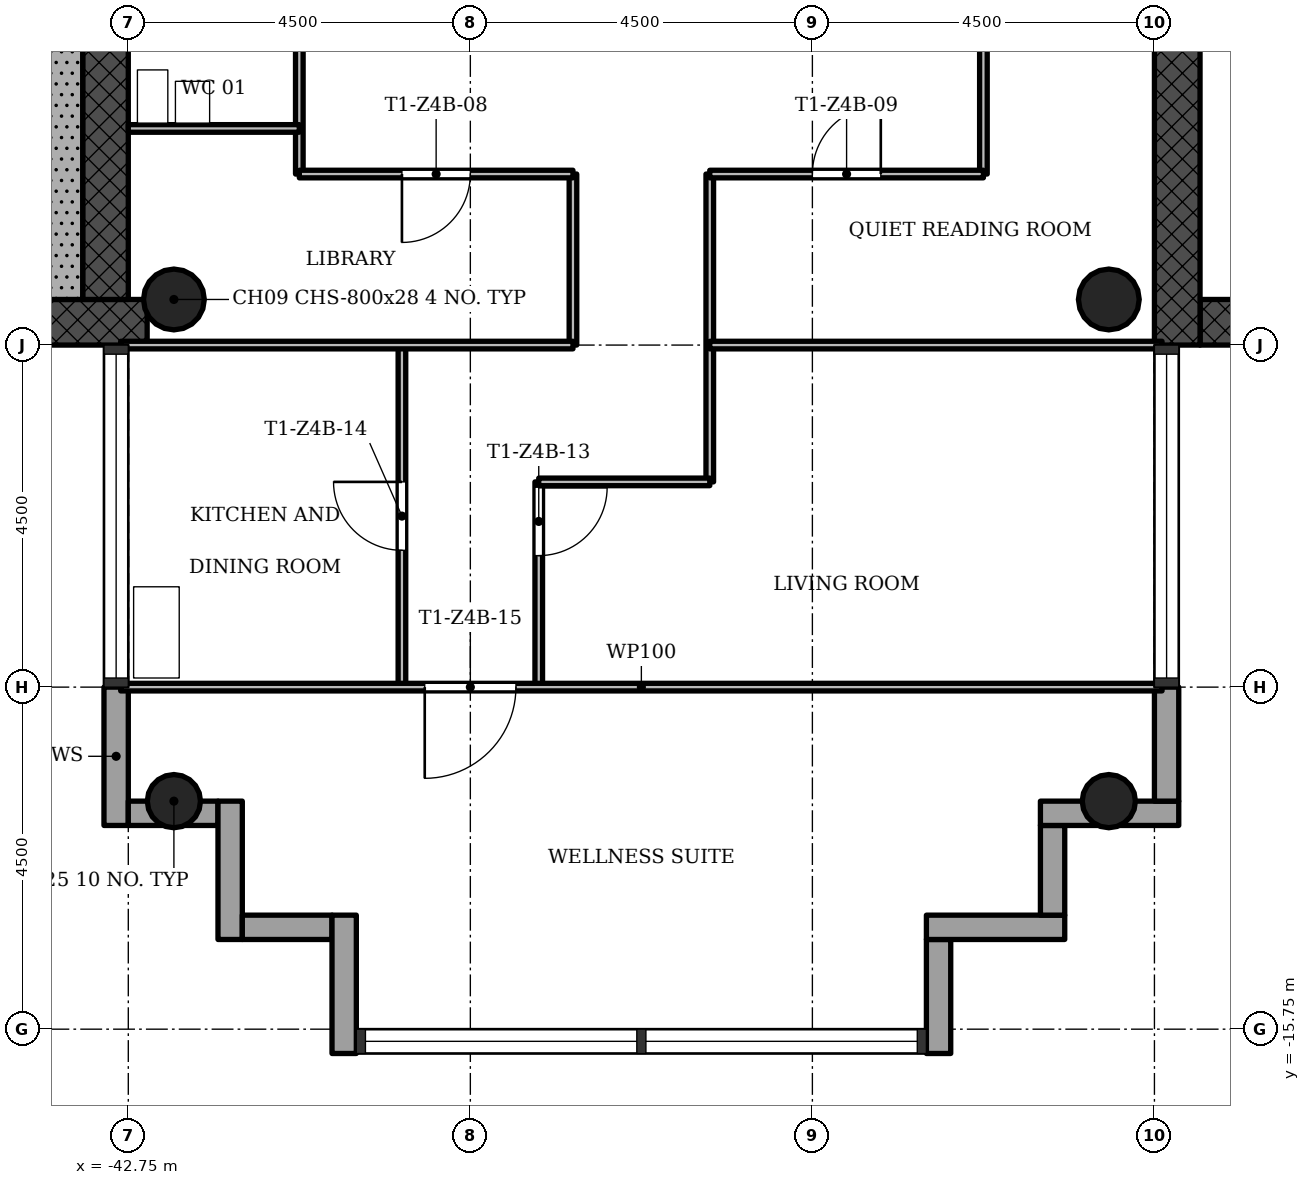
"""IFC4 building model, lengths in metres.
Left out: names, types, materials, properties, quantities, classifications, styles, units other than length and angle.
Written with IfcOpenShell. Run it as: python <this file> out.ifc"""

import sys

from ifc_helpers import new_model, si_unit, direction, frame, frame_2d, origin, origin_2d, place, context, subcontext, project, spatial, rectangle, hollow_circle, extrude, element, fill, save


model = new_model("IFC4")
c1 = context("Model", 3, precision=1e-05, world=origin(), true_north=direction((0.0, 1.0)))
c2 = subcontext(c1, "Body", "Model", "MODEL_VIEW")
j1 = project(units=[si_unit("LENGTHUNIT", "METRE"), si_unit("PLANEANGLEUNIT", "RADIAN")], contexts=[c1])
p1 = place(None, origin())
s1 = spatial("IfcSite", under=j1, at=p1, CompositionType="ELEMENT")
p2 = place(p1, origin())
s2 = spatial("IfcBuilding", under=s1, at=p2, CompositionType="ELEMENT")
p3 = place(p2, frame((0.0, 0.0, 230.0)))
s3 = spatial("IfcBuildingStorey", under=s2, at=p3, CompositionType="ELEMENT", Elevation=230.0)
p4 = place(p3, frame((-28.65, -6.45, 0.0), z_axis=(0.0, 0.0, 1.0), x_axis=(1.0, 0.0, 0.0)))
e1 = element("IfcWall", 1, at=p4, inside=s3, PredefinedType="SHEAR", context=c2, shape_type="SweptSolid", body=[
    extrude(rectangle(XDim=8.4, YDim=0.6, at=frame_2d((4.2, 0.0))), origin(), (0.0, 0.0, 1.0), 3.4),
])
p5 = place(p3, frame((-28.95, 6.15, 0.0), z_axis=(0.0, 0.0, 1.0), x_axis=(0.0, -1.0, 0.0)))
e2 = element("IfcWall", 2, at=p5, inside=s3, PredefinedType="SHEAR", context=c2, shape_type="SweptSolid", body=[
    extrude(rectangle(XDim=12.9, YDim=0.6, at=frame_2d((6.45, 0.0))), origin(), (0.0, 0.0, 1.0), 3.4),
])
p6 = place(p5, frame((5.25, 0.0, 0.0)))
e3 = element("IfcOpeningElement", 3, at=p6, cuts=e2, PredefinedType="OPENING", context=c2, shape_type="SweptSolid", body=[
    extrude(rectangle(XDim=1.8, YDim=2.1, at=frame_2d((0.9, 1.05))), frame((0.0, 0.31, 0.0), z_axis=(0.0, -1.0, 0.0), x_axis=(1.0, 0.0, 0.0)), (0.0, 0.0, 1.0), 0.62),
])
p7 = place(p3, frame((-51.15, -6.45, 0.0), z_axis=(0.0, 0.0, 1.0), x_axis=(1.0, 0.0, 0.0)))
e4 = element("IfcWall", 4, at=p7, inside=s3, PredefinedType="SHEAR", context=c2, shape_type="SweptSolid", body=[
    extrude(rectangle(XDim=8.648, YDim=0.6, at=frame_2d((4.324, 0.0))), origin(), (0.0, 0.0, 1.0), 3.4),
])
p8 = place(p3, frame((-43.05, -6.15, 0.0), z_axis=(0.0, 0.0, 1.0), x_axis=(0.0, 1.0, 0.0)))
e5 = element("IfcWall", 5, at=p8, inside=s3, PredefinedType="SHEAR", context=c2, shape_type="SweptSolid", body=[
    extrude(rectangle(XDim=12.9, YDim=0.6, at=frame_2d((6.45, 0.0))), origin(), (0.0, 0.0, 1.0), 3.4),
])
p9 = place(p8, frame((5.25, 0.0, 0.0)))
e6 = element("IfcOpeningElement", 6, at=p9, cuts=e5, PredefinedType="OPENING", context=c2, shape_type="SweptSolid", body=[
    extrude(rectangle(XDim=1.8, YDim=2.1, at=frame_2d((0.9, 1.05))), frame((0.0, 0.31, 0.0), z_axis=(0.0, -1.0, 0.0), x_axis=(1.0, 0.0, 0.0)), (0.0, 0.0, 1.0), 0.62),
])
for number, where, z_axis, x_axis in (
    (7, (-42.15, -12.75, 0.0), (0.0, 0.0, 1.0), (1.0, 0.0, 0.0)),
    (8, (-29.85, -12.75, 0.0), (0.0, 0.0, 1.0), (1.0, 0.0, 0.0)),
):
    element("IfcColumn", number, at=place(p3, frame(where, z_axis=z_axis, x_axis=x_axis)), inside=s3, PredefinedType="COLUMN", context=c2, shape_type="SweptSolid", body=[
        extrude(hollow_circle(Radius=0.35, WallThickness=0.025, at=origin_2d()), origin(), (0.0, 0.0, 1.0), 3.4),
    ])
for number, where, z_axis, x_axis in (
    (9, (-42.15, -6.15, 0.0), (0.0, 0.0, 1.0), (1.0, 0.0, 0.0)),
    (10, (-29.85, -6.15, 0.0), (0.0, 0.0, 1.0), (1.0, 0.0, 0.0)),
):
    element("IfcColumn", number, at=place(p3, frame(where, z_axis=z_axis, x_axis=x_axis)), inside=s3, PredefinedType="COLUMN", context=c2, shape_type="SweptSolid", body=[
        extrude(hollow_circle(Radius=0.4, WallThickness=0.028, at=origin_2d()), origin(), (0.0, 0.0, 1.0), 3.4),
    ])
p10 = place(p3, frame((-42.91, -11.25, -0.3), z_axis=(0.0, 0.0, 1.0), x_axis=(0.0, -1.0, 0.0)))
e11 = element("IfcWall", 11, at=p10, inside=s3, PredefinedType="STANDARD", context=c2, shape_type="SweptSolid", body=[
    extrude(rectangle(XDim=1.82, YDim=0.32, at=frame_2d((0.91, 0.0))), origin(), (0.0, 0.0, 1.0), 3.4),
])
p11 = place(p3, frame((-42.75, -12.91, -0.3), z_axis=(0.0, 0.0, 1.0), x_axis=(1.0, 0.0, 0.0)))
e12 = element("IfcWall", 12, at=p11, inside=s3, PredefinedType="STANDARD", context=c2, shape_type="SweptSolid", body=[
    extrude(rectangle(XDim=1.18, YDim=0.32, at=frame_2d((0.59, 0.0))), origin(), (0.0, 0.0, 1.0), 3.4),
])
p12 = place(p3, frame((-41.41, -12.75, -0.3), z_axis=(0.0, 0.0, 1.0), x_axis=(0.0, -1.0, 0.0)))
e13 = element("IfcWall", 13, at=p12, inside=s3, PredefinedType="STANDARD", context=c2, shape_type="SweptSolid", body=[
    extrude(rectangle(XDim=1.82, YDim=0.32, at=frame_2d((0.91, 0.0))), origin(), (0.0, 0.0, 1.0), 3.4),
])
p13 = place(p3, frame((-41.25, -14.41, -0.3), z_axis=(0.0, 0.0, 1.0), x_axis=(1.0, 0.0, 0.0)))
e14 = element("IfcWall", 14, at=p13, inside=s3, PredefinedType="STANDARD", context=c2, shape_type="SweptSolid", body=[
    extrude(rectangle(XDim=1.18, YDim=0.32, at=frame_2d((0.59, 0.0))), origin(), (0.0, 0.0, 1.0), 3.4),
])
p14 = place(p3, frame((-39.91, -14.25, -0.3), z_axis=(0.0, 0.0, 1.0), x_axis=(0.0, -1.0, 0.0)))
e15 = element("IfcWall", 15, at=p14, inside=s3, PredefinedType="STANDARD", context=c2, shape_type="SweptSolid", body=[
    extrude(rectangle(XDim=1.82, YDim=0.32, at=frame_2d((0.91, 0.0))), origin(), (0.0, 0.0, 1.0), 3.4),
])
p15 = place(p3, frame((-32.09, -16.07, -0.3), z_axis=(0.0, 0.0, 1.0), x_axis=(0.0, 1.0, 0.0)))
e16 = element("IfcWall", 16, at=p15, inside=s3, PredefinedType="STANDARD", context=c2, shape_type="SweptSolid", body=[
    extrude(rectangle(XDim=1.5, YDim=0.32, at=frame_2d((0.75, 0.0))), origin(), (0.0, 0.0, 1.0), 3.4),
])
p16 = place(p3, frame((-32.25, -14.41, -0.3), z_axis=(0.0, 0.0, 1.0), x_axis=(1.0, 0.0, 0.0)))
e17 = element("IfcWall", 17, at=p16, inside=s3, PredefinedType="STANDARD", context=c2, shape_type="SweptSolid", body=[
    extrude(rectangle(XDim=1.82, YDim=0.32, at=frame_2d((0.91, 0.0))), origin(), (0.0, 0.0, 1.0), 3.4),
])
p17 = place(p3, frame((-30.59, -14.25, -0.3), z_axis=(0.0, 0.0, 1.0), x_axis=(0.0, 1.0, 0.0)))
e18 = element("IfcWall", 18, at=p17, inside=s3, PredefinedType="STANDARD", context=c2, shape_type="SweptSolid", body=[
    extrude(rectangle(XDim=1.18, YDim=0.32, at=frame_2d((0.59, 0.0))), origin(), (0.0, 0.0, 1.0), 3.4),
])
p18 = place(p3, frame((-30.75, -12.91, -0.3), z_axis=(0.0, 0.0, 1.0), x_axis=(1.0, 0.0, 0.0)))
e19 = element("IfcWall", 19, at=p18, inside=s3, PredefinedType="STANDARD", context=c2, shape_type="SweptSolid", body=[
    extrude(rectangle(XDim=1.82, YDim=0.32, at=frame_2d((0.91, 0.0))), origin(), (0.0, 0.0, 1.0), 3.4),
])
p19 = place(p3, frame((-29.09, -12.75, -0.3), z_axis=(0.0, 0.0, 1.0), x_axis=(0.0, 1.0, 0.0)))
e20 = element("IfcWall", 20, at=p19, inside=s3, PredefinedType="STANDARD", context=c2, shape_type="SweptSolid", body=[
    extrude(rectangle(XDim=1.5, YDim=0.32, at=frame_2d((0.75, 0.0))), origin(), (0.0, 0.0, 1.0), 3.4),
])
p20 = place(p3, frame((-40.5, -4.5, 0.0), z_axis=(0.0, 0.0, 1.0), x_axis=(0.0, 1.0, 0.0)))
e21 = element("IfcWall", 21, at=p20, inside=s3, PredefinedType="PARTITIONING", context=c2, shape_type="SweptSolid", body=[
    extrude(rectangle(XDim=3.0, YDim=0.1, at=frame_2d((1.5, 0.0))), origin(), (0.0, 0.0, 1.0), 2.98),
])
p21 = place(p3, frame((-39.15, -11.25, 0.0), z_axis=(0.0, 0.0, 1.0), x_axis=(0.0, 1.0, 0.0)))
e22 = element("IfcWall", 22, at=p21, inside=s3, PredefinedType="PARTITIONING", context=c2, shape_type="SweptSolid", body=[
    extrude(rectangle(XDim=4.5, YDim=0.1, at=frame_2d((2.25, 0.0))), origin(), (0.0, 0.0, 1.0), 2.98),
])
p22 = place(p21, frame((1.8, 0.0, 0.0)))
e23 = element("IfcOpeningElement", 23, at=p22, cuts=e22, PredefinedType="OPENING", context=c2, shape_type="SweptSolid", body=[
    extrude(rectangle(XDim=0.9, YDim=2.1, at=frame_2d((0.45, 1.05))), frame((0.0, 0.06, 0.0), z_axis=(0.0, -1.0, 0.0), x_axis=(1.0, 0.0, 0.0)), (0.0, 0.0, 1.0), 0.12),
])
p23 = place(p3, frame((-37.35, -11.25, 0.0), z_axis=(0.0, 0.0, 1.0), x_axis=(0.0, 1.0, 0.0)))
e24 = element("IfcWall", 24, at=p23, inside=s3, PredefinedType="PARTITIONING", context=c2, shape_type="SweptSolid", body=[
    extrude(rectangle(XDim=2.7, YDim=0.1, at=frame_2d((1.35, 0.0))), origin(), (0.0, 0.0, 1.0), 2.98),
])
p24 = place(p23, frame((1.73, 0.0, 0.0)))
e25 = element("IfcOpeningElement", 25, at=p24, cuts=e24, PredefinedType="OPENING", context=c2, shape_type="SweptSolid", body=[
    extrude(rectangle(XDim=0.9, YDim=2.1, at=frame_2d((0.45, 1.05))), frame((0.0, 0.06, 0.0), z_axis=(0.0, -1.0, 0.0), x_axis=(1.0, 0.0, 0.0)), (0.0, 0.0, 1.0), 0.12),
])
p25 = place(p3, frame((-36.9, -6.75, 0.0), z_axis=(0.0, 0.0, 1.0), x_axis=(0.0, 1.0, 0.0)))
e26 = element("IfcWall", 26, at=p25, inside=s3, PredefinedType="PARTITIONING", context=c2, shape_type="SweptSolid", body=[
    extrude(rectangle(XDim=2.25, YDim=0.1, at=frame_2d((1.125, 0.0))), origin(), (0.0, 0.0, 1.0), 2.98),
])
p26 = place(p3, frame((-35.1, -8.55, 0.0), z_axis=(0.0, 0.0, 1.0), x_axis=(0.0, 1.0, 0.0)))
e27 = element("IfcWall", 27, at=p26, inside=s3, PredefinedType="PARTITIONING", context=c2, shape_type="SweptSolid", body=[
    extrude(rectangle(XDim=4.05, YDim=0.1, at=frame_2d((2.025, 0.0))), origin(), (0.0, 0.0, 1.0), 2.98),
])
p27 = place(p3, frame((-31.5, -4.5, 0.0), z_axis=(0.0, 0.0, 1.0), x_axis=(0.0, 1.0, 0.0)))
e28 = element("IfcWall", 28, at=p27, inside=s3, PredefinedType="PARTITIONING", context=c2, shape_type="SweptSolid", body=[
    extrude(rectangle(XDim=3.0, YDim=0.1, at=frame_2d((1.5, 0.0))), origin(), (0.0, 0.0, 1.0), 2.98),
])
p28 = place(p3, frame((-42.85, -11.25, 0.0), z_axis=(0.0, 0.0, 1.0), x_axis=(1.0, 0.0, 0.0)))
e29 = element("IfcWall", 29, at=p28, inside=s3, PredefinedType="PARTITIONING", context=c2, shape_type="SweptSolid", body=[
    extrude(rectangle(XDim=13.7, YDim=0.1, at=frame_2d((6.85, 0.0))), origin(), (0.0, 0.0, 1.0), 2.98),
])
p29 = place(p28, frame((4.0, 0.0, 0.0)))
e30 = element("IfcOpeningElement", 30, at=p29, cuts=e29, PredefinedType="OPENING", context=c2, shape_type="SweptSolid", body=[
    extrude(rectangle(XDim=1.2, YDim=2.1, at=frame_2d((0.6, 1.05))), frame((0.0, 0.06, 0.0), z_axis=(0.0, -1.0, 0.0), x_axis=(1.0, 0.0, 0.0)), (0.0, 0.0, 1.0), 0.12),
])
p30 = place(p3, frame((-37.35, -8.55, 0.0), z_axis=(0.0, 0.0, 1.0), x_axis=(1.0, 0.0, 0.0)))
e31 = element("IfcWall", 31, at=p30, inside=s3, PredefinedType="PARTITIONING", context=c2, shape_type="SweptSolid", body=[
    extrude(rectangle(XDim=2.25, YDim=0.1, at=frame_2d((1.125, 0.0))), origin(), (0.0, 0.0, 1.0), 2.98),
])
for number, where, z_axis, x_axis in (
    (32, (-42.85, -6.75, 0.0), (0.0, 0.0, 1.0), (1.0, 0.0, 0.0)),
    (33, (-35.1, -6.75, 0.0), (0.0, 0.0, 1.0), (1.0, 0.0, 0.0)),
):
    element("IfcWall", number, at=place(p3, frame(where, z_axis=z_axis, x_axis=x_axis)), inside=s3, PredefinedType="PARTITIONING", context=c2, shape_type="SweptSolid", body=[
        extrude(rectangle(XDim=5.95, YDim=0.1, at=frame_2d((2.975, 0.0))), origin(), (0.0, 0.0, 1.0), 2.98),
    ])
p31 = place(p3, frame((-40.5, -4.5, 0.0), z_axis=(0.0, 0.0, 1.0), x_axis=(1.0, 0.0, 0.0)))
e34 = element("IfcWall", 34, at=p31, inside=s3, PredefinedType="PARTITIONING", context=c2, shape_type="SweptSolid", body=[
    extrude(rectangle(XDim=3.6, YDim=0.1, at=frame_2d((1.8, 0.0))), origin(), (0.0, 0.0, 1.0), 2.98),
])
p32 = place(p31, frame((1.35, 0.0, 0.0)))
e35 = element("IfcOpeningElement", 35, at=p32, cuts=e34, PredefinedType="OPENING", context=c2, shape_type="SweptSolid", body=[
    extrude(rectangle(XDim=0.9, YDim=2.1, at=frame_2d((0.45, 1.05))), frame((0.0, 0.06, 0.0), z_axis=(0.0, -1.0, 0.0), x_axis=(1.0, 0.0, 0.0)), (0.0, 0.0, 1.0), 0.12),
])
p33 = place(p3, frame((-35.1, -4.5, 0.0), z_axis=(0.0, 0.0, 1.0), x_axis=(1.0, 0.0, 0.0)))
e36 = element("IfcWall", 36, at=p33, inside=s3, PredefinedType="PARTITIONING", context=c2, shape_type="SweptSolid", body=[
    extrude(rectangle(XDim=3.6, YDim=0.1, at=frame_2d((1.8, 0.0))), origin(), (0.0, 0.0, 1.0), 2.98),
])
p34 = place(p33, frame((1.35, 0.0, 0.0)))
e37 = element("IfcOpeningElement", 37, at=p34, cuts=e36, PredefinedType="OPENING", context=c2, shape_type="SweptSolid", body=[
    extrude(rectangle(XDim=0.9, YDim=2.1, at=frame_2d((0.45, 1.05))), frame((0.0, 0.06, 0.0), z_axis=(0.0, -1.0, 0.0), x_axis=(1.0, 0.0, 0.0)), (0.0, 0.0, 1.0), 0.12),
])
p35 = place(p3, frame((-42.75, -3.9, 0.0), z_axis=(0.0, 0.0, 1.0), x_axis=(1.0, 0.0, 0.0)))
e38 = element("IfcWall", 38, at=p35, inside=s3, PredefinedType="PARTITIONING", context=c2, shape_type="SweptSolid", body=[
    extrude(rectangle(XDim=2.25, YDim=0.1, at=frame_2d((1.125, 0.0))), origin(), (0.0, 0.0, 1.0), 2.98),
])
p36 = place(p3, frame((-43.65, -1.85, 0.0), z_axis=(0.0, 0.0, 1.0), x_axis=(0.0, -1.0, 0.0)))
e39 = element("IfcWall", 39, at=p36, inside=s3, PredefinedType="SHEAR", context=c2, shape_type="SweptSolid", body=[
    extrude(rectangle(XDim=4.3, YDim=0.6, at=frame_2d((2.15, 0.0))), origin(), (0.0, 0.0, 1.0), 3.4),
])
p37 = place(p32, origin())
e40 = element("IfcDoor", 40, at=p37, inside=s3, OperationType="SINGLE_SWING_LEFT", PredefinedType="DOOR", context=c2, shape_type="SweptSolid", body=[
    extrude(rectangle(XDim=0.9, YDim=2.1, at=frame_2d((0.45, 1.05))), frame((0.0, 0.025, 0.0), z_axis=(0.0, -1.0, 0.0), x_axis=(1.0, 0.0, 0.0)), (0.0, 0.0, 1.0), 0.05),
])
fill(e35, e40)
p38 = place(p34, origin())
e41 = element("IfcDoor", 41, at=p38, inside=s3, OperationType="SINGLE_SWING_LEFT", PredefinedType="DOOR", context=c2, shape_type="SweptSolid", body=[
    extrude(rectangle(XDim=0.9, YDim=2.1, at=frame_2d((0.45, 1.05))), frame((0.0, 0.025, 0.0), z_axis=(0.0, -1.0, 0.0), x_axis=(1.0, 0.0, 0.0)), (0.0, 0.0, 1.0), 0.05),
])
fill(e37, e41)
p39 = place(p24, origin())
e42 = element("IfcDoor", 42, at=p39, inside=s3, OperationType="SINGLE_SWING_RIGHT", PredefinedType="DOOR", context=c2, shape_type="SweptSolid", body=[
    extrude(rectangle(XDim=0.9, YDim=2.1, at=frame_2d((0.45, 1.05))), frame((0.0, 0.025, 0.0), z_axis=(0.0, -1.0, 0.0), x_axis=(1.0, 0.0, 0.0)), (0.0, 0.0, 1.0), 0.05),
])
fill(e25, e42)
p40 = place(p22, origin())
e43 = element("IfcDoor", 43, at=p40, inside=s3, OperationType="SINGLE_SWING_LEFT", PredefinedType="DOOR", context=c2, shape_type="SweptSolid", body=[
    extrude(rectangle(XDim=0.9, YDim=2.1, at=frame_2d((0.45, 1.05))), frame((0.0, 0.025, 0.0), z_axis=(0.0, -1.0, 0.0), x_axis=(1.0, 0.0, 0.0)), (0.0, 0.0, 1.0), 0.05),
])
fill(e23, e43)
p41 = place(p29, origin())
e44 = element("IfcDoor", 44, at=p41, inside=s3, OperationType="SINGLE_SWING_LEFT", PredefinedType="DOOR", context=c2, shape_type="SweptSolid", body=[
    extrude(rectangle(XDim=1.2, YDim=2.1, at=frame_2d((0.6, 1.05))), frame((0.0, 0.025, 0.0), z_axis=(0.0, -1.0, 0.0), x_axis=(1.0, 0.0, 0.0)), (0.0, 0.0, 1.0), 0.05),
])
fill(e30, e44)
save(model, sys.argv[1])
